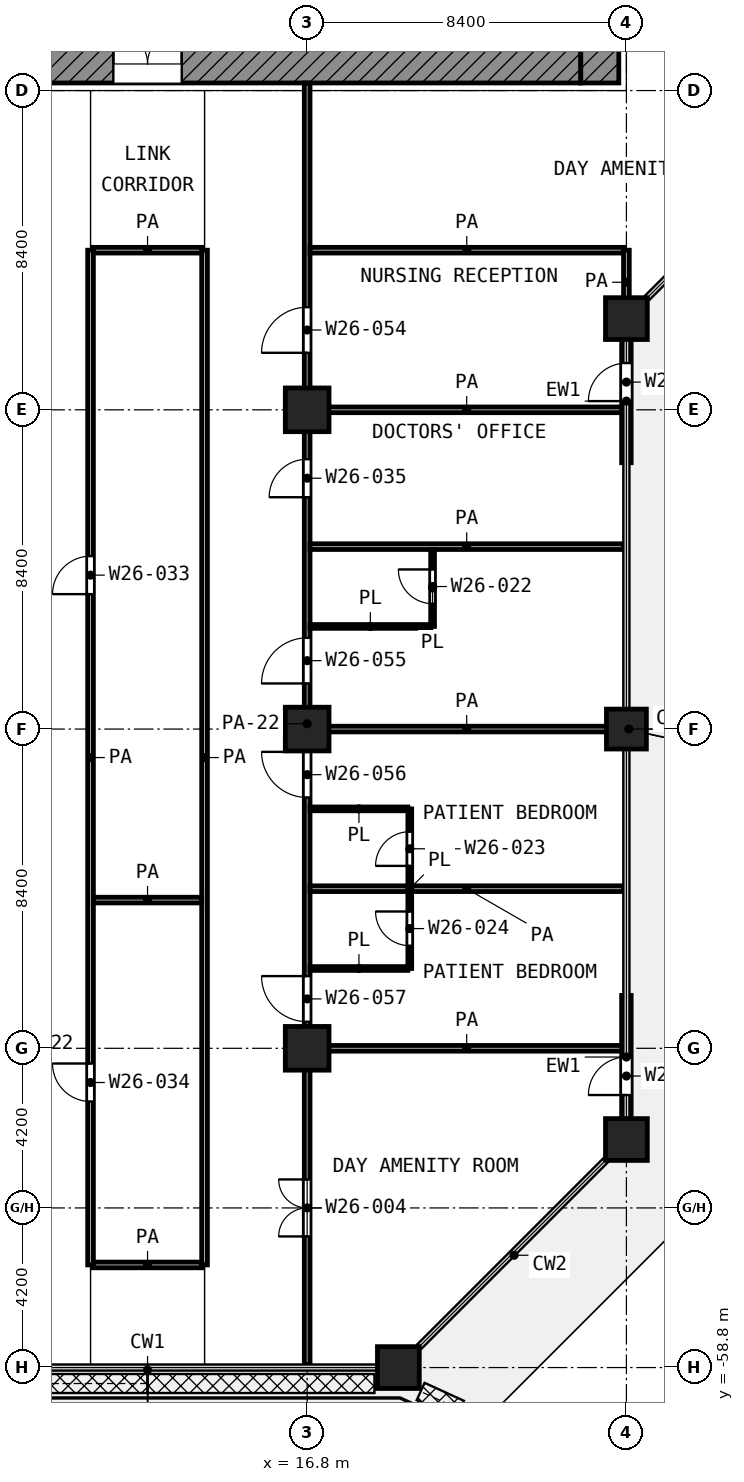
"""IFC4 building model, lengths in metres.
Left out: names, types, materials, properties, quantities, classifications, styles, units other than length and angle.
Written with IfcOpenShell. Run it as: python <this file> out.ifc"""

import sys

from ifc_helpers import new_model, si_unit, direction, frame, frame_2d, origin, origin_2d, place, context, subcontext, project, spatial, rectangle, extrude, element, fill, save


model = new_model("IFC4")
c1 = context("Model", 3, precision=1e-05, world=origin(), true_north=direction((0.0, 1.0)))
c2 = subcontext(c1, "Body", "Model", "MODEL_VIEW")
j1 = project(units=[si_unit("LENGTHUNIT", "METRE"), si_unit("PLANEANGLEUNIT", "RADIAN")], contexts=[c1])
p1 = place(None, origin())
s1 = spatial("IfcSite", under=j1, at=p1, CompositionType="ELEMENT")
p2 = place(p1, origin())
s2 = spatial("IfcBuilding", under=s1, at=p2, CompositionType="ELEMENT")
p3 = place(p2, frame((0.0, 0.0, 136.6)))
s3 = spatial("IfcBuildingStorey", under=s2, at=p3, CompositionType="ELEMENT", Elevation=136.6)
p4 = place(p3, frame((25.2, -31.2, 0.0), z_axis=(0.0, 0.0, 1.0), x_axis=(1.0, 0.0, 0.0)))
e1 = element("IfcColumn", 1, at=p4, inside=s3, PredefinedType="COLUMN", context=c2, shape_type="SweptSolid", body=[
    extrude(rectangle(XDim=1.1, YDim=1.1, at=origin_2d()), origin(), (0.0, 0.0, 1.0), 4.2),
])
for number, where, z_axis, x_axis in (
    (2, (16.8, -33.6, 0.0), (0.0, 0.0, 1.0), (1.0, 0.0, 0.0)),
    (3, (16.8, -42.0, 0.0), (0.0, 0.0, 1.0), (1.0, 0.0, 0.0)),
):
    element("IfcColumn", number, at=place(p3, frame(where, z_axis=z_axis, x_axis=x_axis)), inside=s3, PredefinedType="COLUMN", context=c2, shape_type="SweptSolid", body=[
        extrude(rectangle(XDim=1.15, YDim=1.15, at=origin_2d()), origin(), (0.0, 0.0, 1.0), 4.2),
    ])
p5 = place(p3, frame((25.2, -42.0, 0.0), z_axis=(0.0, 0.0, 1.0), x_axis=(1.0, 0.0, 0.0)))
e4 = element("IfcColumn", 4, at=p5, inside=s3, PredefinedType="COLUMN", context=c2, shape_type="SweptSolid", body=[
    extrude(rectangle(XDim=1.05, YDim=1.05, at=origin_2d()), origin(), (0.0, 0.0, 1.0), 4.2),
])
p6 = place(p3, frame((16.8, -50.4, 0.0), z_axis=(0.0, 0.0, 1.0), x_axis=(1.0, 0.0, 0.0)))
e5 = element("IfcColumn", 5, at=p6, inside=s3, PredefinedType="COLUMN", context=c2, shape_type="SweptSolid", body=[
    extrude(rectangle(XDim=1.15, YDim=1.15, at=origin_2d()), origin(), (0.0, 0.0, 1.0), 4.2),
])
for number, where, z_axis, x_axis in (
    (6, (25.2, -52.8, 0.0), (0.0, 0.0, 1.0), (1.0, 0.0, 0.0)),
    (7, (19.2, -58.8, 0.0), (0.0, 0.0, 1.0), (1.0, 0.0, 0.0)),
):
    element("IfcColumn", number, at=place(p3, frame(where, z_axis=z_axis, x_axis=x_axis)), inside=s3, PredefinedType="COLUMN", context=c2, shape_type="SweptSolid", body=[
        extrude(rectangle(XDim=1.1, YDim=1.1, at=origin_2d()), origin(), (0.0, 0.0, 1.0), 4.2),
    ])
p7 = place(p3, frame((25.2, -52.25, 0.0), z_axis=(0.0, 0.0, 1.0), x_axis=(0.0, 1.0, 0.0)))
e8 = element("IfcWall", 8, at=p7, inside=s3, PredefinedType="SOLIDWALL", context=c2, shape_type="SweptSolid", body=[
    extrude(rectangle(XDim=3.242, YDim=0.25, at=frame_2d((1.621, 0.0))), origin(), (0.0, 0.0, 1.0), 3.48),
])
p8 = place(p7, frame((0.621, 0.0, 0.0)))
e9 = element("IfcOpeningElement", 9, at=p8, cuts=e8, PredefinedType="OPENING", context=c2, shape_type="SweptSolid", body=[
    extrude(rectangle(XDim=1.0, YDim=2.1, at=frame_2d((0.5, 1.05))), frame((0.0, 0.135, 0.0), z_axis=(0.0, -1.0, 0.0), x_axis=(1.0, 0.0, 0.0)), (0.0, 0.0, 1.0), 0.27),
])
p9 = place(p3, frame((25.2, -34.992, 0.0), z_axis=(0.0, 0.0, 1.0), x_axis=(0.0, 1.0, 0.0)))
e10 = element("IfcWall", 10, at=p9, inside=s3, PredefinedType="SOLIDWALL", context=c2, shape_type="SweptSolid", body=[
    extrude(rectangle(XDim=3.242, YDim=0.25, at=frame_2d((1.621, 0.0))), origin(), (0.0, 0.0, 1.0), 3.48),
])
p10 = place(p9, frame((1.621, 0.0, 0.0)))
e11 = element("IfcOpeningElement", 11, at=p10, cuts=e10, PredefinedType="OPENING", context=c2, shape_type="SweptSolid", body=[
    extrude(rectangle(XDim=1.0, YDim=2.1, at=frame_2d((0.5, 1.05))), frame((0.0, 0.135, 0.0), z_axis=(0.0, -1.0, 0.0), x_axis=(1.0, 0.0, 0.0)), (0.0, 0.0, 1.0), 0.27),
])
p11 = place(p3, frame((5.4, -24.5, 0.0), z_axis=(0.0, 0.0, 1.0), x_axis=(1.0, 0.0, 0.0)))
e12 = element("IfcWall", 12, at=p11, inside=s3, PredefinedType="SHEAR", context=c2, shape_type="SweptSolid", body=[
    extrude(rectangle(XDim=18.6, YDim=1.0, at=frame_2d((9.3, 0.0))), origin(), (0.0, 0.0, 1.0), 3.6),
])
p12 = place(p11, frame((6.3, 0.0, 0.0)))
e13 = element("IfcOpeningElement", 13, at=p12, cuts=e12, PredefinedType="OPENING", context=c2, shape_type="SweptSolid", body=[
    extrude(rectangle(XDim=1.8, YDim=2.1, at=frame_2d((0.9, 1.05))), frame((0.0, 0.51, 0.0), z_axis=(0.0, -1.0, 0.0), x_axis=(1.0, 0.0, 0.0)), (0.0, 0.0, 1.0), 1.02),
])
p13 = place(p3, frame((24.5, -25.0, 0.0), z_axis=(0.0, 0.0, 1.0), x_axis=(0.0, 1.0, 0.0)))
e14 = element("IfcWall", 14, at=p13, inside=s3, PredefinedType="SHEAR", context=c2, shape_type="SweptSolid", body=[
    extrude(rectangle(XDim=1.0, YDim=1.0, at=frame_2d((0.5, 0.0))), origin(), (0.0, 0.0, 1.0), 3.6),
])
for number, where, z_axis, x_axis in (
    (15, (16.875, -48.3, 0.0), (0.0, 0.0, 1.0), (1.0, 0.0, 0.0)),
    (16, (16.875, -44.1, 0.0), (0.0, 0.0, 1.0), (1.0, 0.0, 0.0)),
):
    element("IfcWall", number, at=place(p3, frame(where, z_axis=z_axis, x_axis=x_axis)), inside=s3, PredefinedType="PARTITIONING", context=c2, shape_type="SweptSolid", body=[
        extrude(rectangle(XDim=2.575, YDim=0.1, at=frame_2d((1.288, 0.0))), origin(), (0.0, 0.0, 1.0), 3.6),
    ])
p14 = place(p3, frame((16.875, -39.3, 0.0), z_axis=(0.0, 0.0, 1.0), x_axis=(1.0, 0.0, 0.0)))
e17 = element("IfcWall", 17, at=p14, inside=s3, PredefinedType="PARTITIONING", context=c2, shape_type="SweptSolid", body=[
    extrude(rectangle(XDim=3.175, YDim=0.1, at=frame_2d((1.587, 0.0))), origin(), (0.0, 0.0, 1.0), 3.6),
])
p15 = place(p3, frame((19.5, -48.3, 0.0), z_axis=(0.0, 0.0, 1.0), x_axis=(0.0, 1.0, 0.0)))
e18 = element("IfcWall", 18, at=p15, inside=s3, PredefinedType="PARTITIONING", context=c2, shape_type="SweptSolid", body=[
    extrude(rectangle(XDim=4.2, YDim=0.1, at=frame_2d((2.1, 0.0))), origin(), (0.0, 0.0, 1.0), 3.6),
])
p16 = place(p15, frame((2.7, 0.0, 0.0)))
e19 = element("IfcOpeningElement", 19, at=p16, cuts=e18, PredefinedType="OPENING", context=c2, shape_type="SweptSolid", body=[
    extrude(rectangle(XDim=0.9, YDim=2.1, at=frame_2d((0.45, 1.05))), frame((0.0, 0.06, 0.0), z_axis=(0.0, -1.0, 0.0), x_axis=(1.0, 0.0, 0.0)), (0.0, 0.0, 1.0), 0.12),
])
p17 = place(p15, frame((0.6, 0.0, 0.0)))
e20 = element("IfcOpeningElement", 20, at=p17, cuts=e18, PredefinedType="OPENING", context=c2, shape_type="SweptSolid", body=[
    extrude(rectangle(XDim=0.9, YDim=2.1, at=frame_2d((0.45, 1.05))), frame((0.0, 0.06, 0.0), z_axis=(0.0, -1.0, 0.0), x_axis=(1.0, 0.0, 0.0)), (0.0, 0.0, 1.0), 0.12),
])
p18 = place(p3, frame((20.1, -39.3, 0.0), z_axis=(0.0, 0.0, 1.0), x_axis=(0.0, 1.0, 0.0)))
e21 = element("IfcWall", 21, at=p18, inside=s3, PredefinedType="PARTITIONING", context=c2, shape_type="SweptSolid", body=[
    extrude(rectangle(XDim=2.025, YDim=0.1, at=frame_2d((1.013, 0.0))), origin(), (0.0, 0.0, 1.0), 3.6),
])
p19 = place(p18, frame((0.6, 0.0, 0.0)))
e22 = element("IfcOpeningElement", 22, at=p19, cuts=e21, PredefinedType="OPENING", context=c2, shape_type="SweptSolid", body=[
    extrude(rectangle(XDim=0.9, YDim=2.1, at=frame_2d((0.45, 1.05))), frame((0.0, 0.06, 0.0), z_axis=(0.0, -1.0, 0.0), x_axis=(1.0, 0.0, 0.0)), (0.0, 0.0, 1.0), 0.12),
])
p20 = place(p3, frame((11.175, -56.1, 0.0), z_axis=(0.0, 0.0, 1.0), x_axis=(1.0, 0.0, 0.0)))
e23 = element("IfcWall", 23, at=p20, inside=s3, PredefinedType="PARTITIONING", context=c2, shape_type="SweptSolid", body=[
    extrude(rectangle(XDim=2.85, YDim=0.15, at=frame_2d((1.425, 0.0))), origin(), (0.0, 0.0, 1.0), 3.6),
])
p21 = place(p3, frame((16.875, -50.4, 0.0), z_axis=(0.0, 0.0, 1.0), x_axis=(1.0, 0.0, 0.0)))
e24 = element("IfcWall", 24, at=p21, inside=s3, PredefinedType="PARTITIONING", context=c2, shape_type="SweptSolid", body=[
    extrude(rectangle(XDim=8.245, YDim=0.15, at=frame_2d((4.123, 0.0))), origin(), (0.0, 0.0, 1.0), 3.6),
])
p22 = place(p3, frame((11.175, -46.5, 0.0), z_axis=(0.0, 0.0, 1.0), x_axis=(1.0, 0.0, 0.0)))
e25 = element("IfcWall", 25, at=p22, inside=s3, PredefinedType="PARTITIONING", context=c2, shape_type="SweptSolid", body=[
    extrude(rectangle(XDim=2.85, YDim=0.15, at=frame_2d((1.425, 0.0))), origin(), (0.0, 0.0, 1.0), 3.6),
])
for number, where, z_axis, x_axis in (
    (26, (16.875, -46.2, 0.0), (0.0, 0.0, 1.0), (1.0, 0.0, 0.0)),
    (27, (16.875, -42.0, 0.0), (0.0, 0.0, 1.0), (1.0, 0.0, 0.0)),
    (28, (16.875, -37.2, 0.0), (0.0, 0.0, 1.0), (1.0, 0.0, 0.0)),
    (29, (16.875, -33.6, 0.0), (0.0, 0.0, 1.0), (1.0, 0.0, 0.0)),
):
    element("IfcWall", number, at=place(p3, frame(where, z_axis=z_axis, x_axis=x_axis)), inside=s3, PredefinedType="PARTITIONING", context=c2, shape_type="SweptSolid", body=[
        extrude(rectangle(XDim=8.245, YDim=0.15, at=frame_2d((4.123, 0.0))), origin(), (0.0, 0.0, 1.0), 3.6),
    ])
p23 = place(p3, frame((11.175, -29.4, 0.0), z_axis=(0.0, 0.0, 1.0), x_axis=(1.0, 0.0, 0.0)))
e30 = element("IfcWall", 30, at=p23, inside=s3, PredefinedType="PARTITIONING", context=c2, shape_type="SweptSolid", body=[
    extrude(rectangle(XDim=2.85, YDim=0.15, at=frame_2d((1.425, 0.0))), origin(), (0.0, 0.0, 1.0), 3.6),
])
p24 = place(p3, frame((16.875, -29.4, 0.0), z_axis=(0.0, 0.0, 1.0), x_axis=(1.0, 0.0, 0.0)))
e31 = element("IfcWall", 31, at=p24, inside=s3, PredefinedType="PARTITIONING", context=c2, shape_type="SweptSolid", body=[
    extrude(rectangle(XDim=8.25, YDim=0.15, at=frame_2d((4.125, 0.0))), origin(), (0.0, 0.0, 1.0), 3.6),
])
p25 = place(p3, frame((11.1, -56.1, 0.0), z_axis=(0.0, 0.0, 1.0), x_axis=(0.0, 1.0, 0.0)))
e32 = element("IfcWall", 32, at=p25, inside=s3, PredefinedType="PARTITIONING", context=c2, shape_type="SweptSolid", body=[
    extrude(rectangle(XDim=26.7, YDim=0.15, at=frame_2d((13.35, 0.0))), origin(), (0.0, 0.0, 1.0), 3.6),
])
p26 = place(p25, frame((17.65, 0.0, 0.0)))
e33 = element("IfcOpeningElement", 33, at=p26, cuts=e32, PredefinedType="OPENING", context=c2, shape_type="SweptSolid", body=[
    extrude(rectangle(XDim=1.0, YDim=2.1, at=frame_2d((0.5, 1.05))), frame((0.0, 0.085, 0.0), z_axis=(0.0, -1.0, 0.0), x_axis=(1.0, 0.0, 0.0)), (0.0, 0.0, 1.0), 0.17),
])
p27 = place(p25, frame((4.3, 0.0, 0.0)))
e34 = element("IfcOpeningElement", 34, at=p27, cuts=e32, PredefinedType="OPENING", context=c2, shape_type="SweptSolid", body=[
    extrude(rectangle(XDim=1.0, YDim=2.1, at=frame_2d((0.5, 1.05))), frame((0.0, 0.085, 0.0), z_axis=(0.0, -1.0, 0.0), x_axis=(1.0, 0.0, 0.0)), (0.0, 0.0, 1.0), 0.17),
])
p28 = place(p3, frame((14.1, -56.1, 0.0), z_axis=(0.0, 0.0, 1.0), x_axis=(0.0, 1.0, 0.0)))
e35 = element("IfcWall", 35, at=p28, inside=s3, PredefinedType="PARTITIONING", context=c2, shape_type="SweptSolid", body=[
    extrude(rectangle(XDim=26.7, YDim=0.15, at=frame_2d((13.35, 0.0))), origin(), (0.0, 0.0, 1.0), 3.6),
])
p29 = place(p3, frame((16.8, -58.72, 0.0), z_axis=(0.0, 0.0, 1.0), x_axis=(0.0, 1.0, 0.0)))
e36 = element("IfcWall", 36, at=p29, inside=s3, PredefinedType="PARTITIONING", context=c2, shape_type="SweptSolid", body=[
    extrude(rectangle(XDim=33.72, YDim=0.15, at=frame_2d((16.86, 0.0))), origin(), (0.0, 0.0, 1.0), 2.7),
])
p30 = place(p29, frame((26.62, 0.0, 0.0)))
e37 = element("IfcOpeningElement", 37, at=p30, cuts=e36, PredefinedType="OPENING", context=c2, shape_type="SweptSolid", body=[
    extrude(rectangle(XDim=1.2, YDim=2.1, at=frame_2d((0.6, 1.05))), frame((0.0, 0.085, 0.0), z_axis=(0.0, -1.0, 0.0), x_axis=(1.0, 0.0, 0.0)), (0.0, 0.0, 1.0), 0.17),
])
p31 = place(p29, frame((22.82, 0.0, 0.0)))
e38 = element("IfcOpeningElement", 38, at=p31, cuts=e36, PredefinedType="OPENING", context=c2, shape_type="SweptSolid", body=[
    extrude(rectangle(XDim=1.0, YDim=2.1, at=frame_2d((0.5, 1.05))), frame((0.0, 0.085, 0.0), z_axis=(0.0, -1.0, 0.0), x_axis=(1.0, 0.0, 0.0)), (0.0, 0.0, 1.0), 0.17),
])
p32 = place(p29, frame((17.92, 0.0, 0.0)))
e39 = element("IfcOpeningElement", 39, at=p32, cuts=e36, PredefinedType="OPENING", context=c2, shape_type="SweptSolid", body=[
    extrude(rectangle(XDim=1.2, YDim=2.1, at=frame_2d((0.6, 1.05))), frame((0.0, 0.085, 0.0), z_axis=(0.0, -1.0, 0.0), x_axis=(1.0, 0.0, 0.0)), (0.0, 0.0, 1.0), 0.17),
])
p33 = place(p29, frame((14.92, 0.0, 0.0)))
e40 = element("IfcOpeningElement", 40, at=p33, cuts=e36, PredefinedType="OPENING", context=c2, shape_type="SweptSolid", body=[
    extrude(rectangle(XDim=1.2, YDim=2.1, at=frame_2d((0.6, 1.05))), frame((0.0, 0.085, 0.0), z_axis=(0.0, -1.0, 0.0), x_axis=(1.0, 0.0, 0.0)), (0.0, 0.0, 1.0), 0.17),
])
p34 = place(p29, frame((9.02, 0.0, 0.0)))
e41 = element("IfcOpeningElement", 41, at=p34, cuts=e36, PredefinedType="OPENING", context=c2, shape_type="SweptSolid", body=[
    extrude(rectangle(XDim=1.2, YDim=2.1, at=frame_2d((0.6, 1.05))), frame((0.0, 0.085, 0.0), z_axis=(0.0, -1.0, 0.0), x_axis=(1.0, 0.0, 0.0)), (0.0, 0.0, 1.0), 0.17),
])
p35 = place(p29, frame((3.37, 0.0, 0.0)))
e42 = element("IfcOpeningElement", 42, at=p35, cuts=e36, PredefinedType="OPENING", context=c2, shape_type="SweptSolid", body=[
    extrude(rectangle(XDim=1.5, YDim=2.1, at=frame_2d((0.75, 1.05))), frame((0.0, 0.085, 0.0), z_axis=(0.0, -1.0, 0.0), x_axis=(1.0, 0.0, 0.0)), (0.0, 0.0, 1.0), 0.17),
])
p36 = place(p3, frame((25.2, -31.087, 0.0), z_axis=(0.0, 0.0, 1.0), x_axis=(0.0, 1.0, 0.0)))
e43 = element("IfcWall", 43, at=p36, inside=s3, PredefinedType="PARTITIONING", context=c2, shape_type="SweptSolid", body=[
    extrude(rectangle(XDim=1.687, YDim=0.15, at=frame_2d((0.844, 0.0))), origin(), (0.0, 0.0, 1.0), 3.6),
])
p37 = place(p8, origin())
e44 = element("IfcDoor", 44, at=p37, inside=s3, OperationType="SINGLE_SWING_LEFT", PredefinedType="DOOR", context=c2, shape_type="SweptSolid", body=[
    extrude(rectangle(XDim=1.0, YDim=2.1, at=frame_2d((0.5, 1.05))), frame((0.0, 0.025, 0.0), z_axis=(0.0, -1.0, 0.0), x_axis=(1.0, 0.0, 0.0)), (0.0, 0.0, 1.0), 0.05),
])
fill(e9, e44)
p38 = place(p10, origin())
e45 = element("IfcDoor", 45, at=p38, inside=s3, OperationType="SINGLE_SWING_LEFT", PredefinedType="DOOR", context=c2, shape_type="SweptSolid", body=[
    extrude(rectangle(XDim=1.0, YDim=2.1, at=frame_2d((0.5, 1.05))), frame((0.0, 0.025, 0.0), z_axis=(0.0, -1.0, 0.0), x_axis=(1.0, 0.0, 0.0)), (0.0, 0.0, 1.0), 0.05),
])
fill(e11, e45)
p39 = place(p12, origin())
e46 = element("IfcDoor", 46, at=p39, inside=s3, OperationType="DOUBLE_DOOR_SINGLE_SWING", PredefinedType="DOOR", context=c2, shape_type="SweptSolid", body=[
    extrude(rectangle(XDim=1.8, YDim=2.1, at=frame_2d((0.9, 1.05))), frame((0.0, 0.025, 0.0), z_axis=(0.0, -1.0, 0.0), x_axis=(1.0, 0.0, 0.0)), (0.0, 0.0, 1.0), 0.05),
])
fill(e13, e46)
p40 = place(p26, origin())
e47 = element("IfcDoor", 47, at=p40, inside=s3, OperationType="SINGLE_SWING_LEFT", PredefinedType="DOOR", context=c2, shape_type="SweptSolid", body=[
    extrude(rectangle(XDim=1.0, YDim=2.1, at=frame_2d((0.5, 1.05))), frame((0.0, 0.025, 0.0), z_axis=(0.0, -1.0, 0.0), x_axis=(1.0, 0.0, 0.0)), (0.0, 0.0, 1.0), 0.05),
])
fill(e33, e47)
p41 = place(p27, origin())
e48 = element("IfcDoor", 48, at=p41, inside=s3, OperationType="SINGLE_SWING_RIGHT", PredefinedType="DOOR", context=c2, shape_type="SweptSolid", body=[
    extrude(rectangle(XDim=1.0, YDim=2.1, at=frame_2d((0.5, 1.05))), frame((0.0, 0.025, 0.0), z_axis=(0.0, -1.0, 0.0), x_axis=(1.0, 0.0, 0.0)), (0.0, 0.0, 1.0), 0.05),
])
fill(e34, e48)
p42 = place(p30, origin())
e49 = element("IfcDoor", 49, at=p42, inside=s3, OperationType="SINGLE_SWING_LEFT", PredefinedType="DOOR", context=c2, shape_type="SweptSolid", body=[
    extrude(rectangle(XDim=1.2, YDim=2.1, at=frame_2d((0.6, 1.05))), frame((0.0, 0.025, 0.0), z_axis=(0.0, -1.0, 0.0), x_axis=(1.0, 0.0, 0.0)), (0.0, 0.0, 1.0), 0.05),
])
fill(e37, e49)
p43 = place(p31, origin())
e50 = element("IfcDoor", 50, at=p43, inside=s3, OperationType="SINGLE_SWING_LEFT", PredefinedType="DOOR", context=c2, shape_type="SweptSolid", body=[
    extrude(rectangle(XDim=1.0, YDim=2.1, at=frame_2d((0.5, 1.05))), frame((0.0, 0.025, 0.0), z_axis=(0.0, -1.0, 0.0), x_axis=(1.0, 0.0, 0.0)), (0.0, 0.0, 1.0), 0.05),
])
fill(e38, e50)
p44 = place(p32, origin())
e51 = element("IfcDoor", 51, at=p44, inside=s3, OperationType="SINGLE_SWING_LEFT", PredefinedType="DOOR", context=c2, shape_type="SweptSolid", body=[
    extrude(rectangle(XDim=1.2, YDim=2.1, at=frame_2d((0.6, 1.05))), frame((0.0, 0.025, 0.0), z_axis=(0.0, -1.0, 0.0), x_axis=(1.0, 0.0, 0.0)), (0.0, 0.0, 1.0), 0.05),
])
fill(e39, e51)
p45 = place(p19, origin())
e52 = element("IfcDoor", 52, at=p45, inside=s3, OperationType="SINGLE_SWING_RIGHT", PredefinedType="DOOR", context=c2, shape_type="SweptSolid", body=[
    extrude(rectangle(XDim=0.9, YDim=2.1, at=frame_2d((0.45, 1.05))), frame((0.0, 0.025, 0.0), z_axis=(0.0, -1.0, 0.0), x_axis=(1.0, 0.0, 0.0)), (0.0, 0.0, 1.0), 0.05),
])
fill(e22, e52)
p46 = place(p33, origin())
e53 = element("IfcDoor", 53, at=p46, inside=s3, OperationType="SINGLE_SWING_RIGHT", PredefinedType="DOOR", context=c2, shape_type="SweptSolid", body=[
    extrude(rectangle(XDim=1.2, YDim=2.1, at=frame_2d((0.6, 1.05))), frame((0.0, 0.025, 0.0), z_axis=(0.0, -1.0, 0.0), x_axis=(1.0, 0.0, 0.0)), (0.0, 0.0, 1.0), 0.05),
])
fill(e40, e53)
p47 = place(p16, origin())
e54 = element("IfcDoor", 54, at=p47, inside=s3, OperationType="SINGLE_SWING_LEFT", PredefinedType="DOOR", context=c2, shape_type="SweptSolid", body=[
    extrude(rectangle(XDim=0.9, YDim=2.1, at=frame_2d((0.45, 1.05))), frame((0.0, 0.025, 0.0), z_axis=(0.0, -1.0, 0.0), x_axis=(1.0, 0.0, 0.0)), (0.0, 0.0, 1.0), 0.05),
])
fill(e19, e54)
p48 = place(p34, origin())
e55 = element("IfcDoor", 55, at=p48, inside=s3, OperationType="SINGLE_SWING_RIGHT", PredefinedType="DOOR", context=c2, shape_type="SweptSolid", body=[
    extrude(rectangle(XDim=1.2, YDim=2.1, at=frame_2d((0.6, 1.05))), frame((0.0, 0.025, 0.0), z_axis=(0.0, -1.0, 0.0), x_axis=(1.0, 0.0, 0.0)), (0.0, 0.0, 1.0), 0.05),
])
fill(e41, e55)
p49 = place(p17, origin())
e56 = element("IfcDoor", 56, at=p49, inside=s3, OperationType="SINGLE_SWING_RIGHT", PredefinedType="DOOR", context=c2, shape_type="SweptSolid", body=[
    extrude(rectangle(XDim=0.9, YDim=2.1, at=frame_2d((0.45, 1.05))), frame((0.0, 0.025, 0.0), z_axis=(0.0, -1.0, 0.0), x_axis=(1.0, 0.0, 0.0)), (0.0, 0.0, 1.0), 0.05),
])
fill(e20, e56)
p50 = place(p35, origin())
e57 = element("IfcDoor", 57, at=p50, inside=s3, OperationType="DOUBLE_DOOR_SINGLE_SWING", PredefinedType="DOOR", context=c2, shape_type="SweptSolid", body=[
    extrude(rectangle(XDim=1.5, YDim=2.1, at=frame_2d((0.75, 1.05))), frame((0.0, 0.025, 0.0), z_axis=(0.0, -1.0, 0.0), x_axis=(1.0, 0.0, 0.0)), (0.0, 0.0, 1.0), 0.05),
])
fill(e42, e57)
save(model, sys.argv[1])
